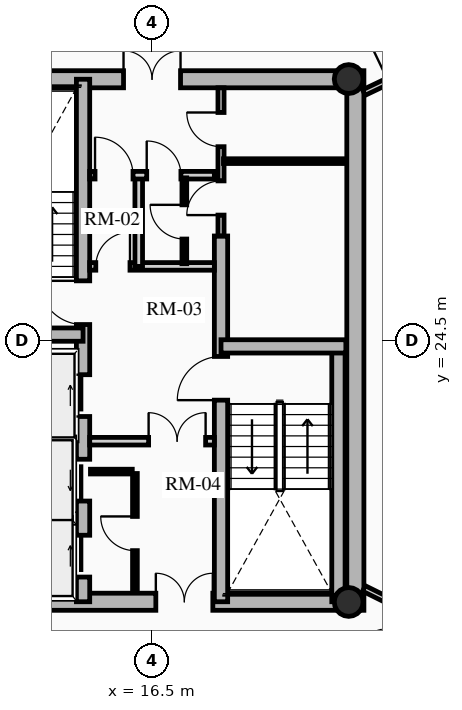
"""IFC4 building model, lengths in metres.
Left out: names, types, materials, properties, quantities, classifications, styles, units other than length and angle.
Written with IfcOpenShell. Run it as: python <this file> out.ifc"""

import sys

from ifc_helpers import new_model, si_unit, direction, frame, frame_2d, origin, origin_2d, place, context, subcontext, project, spatial, rectangle, hollow_circle, extrude, source, transform, mapped, element, fill, save


model = new_model("IFC4")
c1 = context("Model", 3, precision=1e-05, world=origin(), true_north=direction((0.0, 1.0)))
c2 = subcontext(c1, "Body", "Model", "MODEL_VIEW")
j1 = project(units=[si_unit("LENGTHUNIT", "METRE"), si_unit("PLANEANGLEUNIT", "RADIAN")], contexts=[c1])
p1 = place(None, origin())
s1 = spatial("IfcSite", under=j1, at=p1, CompositionType="ELEMENT")
p2 = place(p1, origin())
s2 = spatial("IfcBuilding", under=s1, at=p2, CompositionType="ELEMENT")
p3 = place(p2, frame((0.0, 0.0, 144.04)))
s3 = spatial("IfcBuildingStorey", under=s2, at=p3, CompositionType="ELEMENT", Elevation=144.04)
p4 = place(p3, frame((21.85, 17.4, 0.0), z_axis=(0.0, 0.0, 1.0), x_axis=(0.0, 1.0, 0.0)))
e1 = element("IfcWall", 1, at=p4, inside=s3, PredefinedType="SHEAR", context=c2, shape_type="SweptSolid", body=[
    extrude(rectangle(XDim=14.2, YDim=0.45, at=frame_2d((7.1, 0.0))), origin(), (0.0, 0.0, 1.0), 3.06),
])
p5 = place(p3, frame((11.15, 17.625, 0.0), z_axis=(0.0, 0.0, 1.0), x_axis=(1.0, 0.0, 0.0)))
e2 = element("IfcWall", 2, at=p5, inside=s3, PredefinedType="SHEAR", context=c2, shape_type="SweptSolid", body=[
    extrude(rectangle(XDim=10.7, YDim=0.45, at=frame_2d((5.35, 0.0))), origin(), (0.0, 0.0, 1.0), 3.06),
])
m1 = source(origin(), c2, "Body", "SweptSolid", [
    extrude(rectangle(XDim=1.5, YDim=2.02, at=frame_2d((0.75, 1.01))), frame((0.0, 0.235, 0.0), z_axis=(0.0, -1.0, 0.0), x_axis=(1.0, 0.0, 0.0)), (0.0, 0.0, 1.0), 0.47),
])
p6 = place(p5, frame((5.45, 0.0, 0.0)))
e3 = element("IfcOpeningElement", 3, at=p6, cuts=e2, PredefinedType="OPENING", context=c2, shape_type="MappedRepresentation", body=[
    mapped(m1, transform((0.0, 0.0, 0.0), x_axis=(1.0, 0.0, 0.0), y_axis=(0.0, 1.0, 0.0), z_axis=(0.0, 0.0, 1.0), scale=1.0)),
])
p7 = place(p3, frame((11.15, 31.375, 0.0), z_axis=(0.0, 0.0, 1.0), x_axis=(1.0, 0.0, 0.0)))
e4 = element("IfcWall", 4, at=p7, inside=s3, PredefinedType="SHEAR", context=c2, shape_type="SweptSolid", body=[
    extrude(rectangle(XDim=10.7, YDim=0.45, at=frame_2d((5.35, 0.0))), origin(), (0.0, 0.0, 1.0), 3.06),
])
p8 = place(p7, frame((4.6, 0.0, 0.0)))
e5 = element("IfcOpeningElement", 5, at=p8, cuts=e4, PredefinedType="OPENING", context=c2, shape_type="MappedRepresentation", body=[
    mapped(m1, transform((0.0, 0.0, 0.0), x_axis=(1.0, 0.0, 0.0), y_axis=(0.0, 1.0, 0.0), z_axis=(0.0, 0.0, 1.0), scale=1.0)),
])
p9 = place(p3, frame((14.685, 17.625, 0.0), z_axis=(0.0, 0.0, 1.0), x_axis=(0.0, 1.0, 0.0)))
e6 = element("IfcWall", 6, at=p9, inside=s3, PredefinedType="SHEAR", context=c2, shape_type="SweptSolid", body=[
    extrude(rectangle(XDim=13.75, YDim=0.35, at=frame_2d((6.875, 0.0))), origin(), (0.0, 0.0, 1.0), 3.06),
])
m2 = source(origin(), c2, "Body", "SweptSolid", [
    extrude(rectangle(XDim=1.1, YDim=2.015, at=frame_2d((0.55, 1.007))), frame((0.0, 0.185, 0.0), z_axis=(0.0, -1.0, 0.0), x_axis=(1.0, 0.0, 0.0)), (0.0, 0.0, 1.0), 0.37),
])
p10 = place(p9, frame((4.875, 0.0, 0.0)))
e7 = element("IfcOpeningElement", 7, at=p10, cuts=e6, PredefinedType="OPENING", context=c2, shape_type="MappedRepresentation", body=[
    mapped(m2, transform((0.0, 0.0, 0.0), x_axis=(1.0, 0.0, 0.0), y_axis=(0.0, 1.0, 0.0), z_axis=(0.0, 0.0, 1.0), scale=1.0)),
])
p11 = place(p9, frame((0.65, 0.0, 0.0)))
e8 = element("IfcOpeningElement", 8, at=p11, cuts=e6, PredefinedType="OPENING", context=c2, shape_type="MappedRepresentation", body=[
    mapped(m2, transform((0.0, 0.0, 0.0), x_axis=(1.0, 0.0, 0.0), y_axis=(0.0, 1.0, 0.0), z_axis=(0.0, 0.0, 1.0), scale=1.0)),
])
p12 = place(p9, frame((2.65, 0.0, 0.0)))
e9 = element("IfcOpeningElement", 9, at=p12, cuts=e6, PredefinedType="OPENING", context=c2, shape_type="MappedRepresentation", body=[
    mapped(m2, transform((0.0, 0.0, 0.0), x_axis=(1.0, 0.0, 0.0), y_axis=(0.0, 1.0, 0.0), z_axis=(0.0, 0.0, 1.0), scale=1.0)),
])
m3 = source(origin(), c2, "Body", "SweptSolid", [
    extrude(rectangle(XDim=1.15, YDim=2.02, at=frame_2d((0.575, 1.01))), frame((0.0, 0.185, 0.0), z_axis=(0.0, -1.0, 0.0), x_axis=(1.0, 0.0, 0.0)), (0.0, 0.0, 1.0), 0.37),
])
p13 = place(p9, frame((7.295, 0.0, 0.0)))
e10 = element("IfcOpeningElement", 10, at=p13, cuts=e6, PredefinedType="OPENING", context=c2, shape_type="MappedRepresentation", body=[
    mapped(m3, transform((0.0, 0.0, 0.0), x_axis=(1.0, 0.0, 0.0), y_axis=(0.0, 1.0, 0.0), z_axis=(0.0, 0.0, 1.0), scale=1.0)),
])
p14 = place(p3, frame((18.315, 17.625, 0.0), z_axis=(0.0, 0.0, 1.0), x_axis=(0.0, 1.0, 0.0)))
e11 = element("IfcWall", 11, at=p14, inside=s3, PredefinedType="SHEAR", context=c2, shape_type="SweptSolid", body=[
    extrude(rectangle(XDim=9.625, YDim=0.35, at=frame_2d((4.812, 0.0))), origin(), (0.0, 0.0, 1.0), 3.06),
])
p15 = place(p14, frame((5.305, 0.0, 0.0)))
e12 = element("IfcOpeningElement", 12, at=p15, cuts=e11, PredefinedType="OPENING", context=c2, shape_type="MappedRepresentation", body=[
    mapped(m3, transform((0.0, 0.0, 0.0), x_axis=(1.0, 0.0, 0.0), y_axis=(0.0, 1.0, 0.0), z_axis=(0.0, 0.0, 1.0), scale=1.0)),
])
p16 = place(p3, frame((11.4, 24.655, 0.0), z_axis=(0.0, 0.0, 1.0), x_axis=(1.0, 0.0, 0.0)))
e13 = element("IfcWall", 13, at=p16, inside=s3, PredefinedType="SHEAR", context=c2, shape_type="SweptSolid", body=[
    extrude(rectangle(XDim=3.285, YDim=0.35, at=frame_2d((1.643, 0.0))), origin(), (0.0, 0.0, 1.0), 3.06),
])
p17 = place(p3, frame((21.405, 17.625, 0.0), z_axis=(0.0, 0.0, 1.0), x_axis=(0.0, 1.0, 0.0)))
e14 = element("IfcWall", 14, at=p17, inside=s3, PredefinedType="SHEAR", context=c2, shape_type="SweptSolid", body=[
    extrude(rectangle(XDim=6.72, YDim=0.35, at=frame_2d((3.36, 0.0))), origin(), (0.0, 0.0, 1.0), 3.06),
])
p18 = place(p3, frame((18.315, 24.345, 0.0), z_axis=(0.0, 0.0, 1.0), x_axis=(1.0, 0.0, 0.0)))
e15 = element("IfcWall", 15, at=p18, inside=s3, PredefinedType="SHEAR", context=c2, shape_type="SweptSolid", body=[
    extrude(rectangle(XDim=3.285, YDim=0.35, at=frame_2d((1.643, 0.0))), origin(), (0.0, 0.0, 1.0), 3.06),
])
for number, where, z_axis, x_axis in (
    (16, (21.675, 17.62, 0.0), (0.0, 0.0, 1.0), (1.0, 0.0, 0.0)),
    (17, (21.675, 31.38, 0.0), (0.0, 0.0, 1.0), (1.0, 0.0, 0.0)),
):
    element("IfcColumn", number, at=place(p3, frame(where, z_axis=z_axis, x_axis=x_axis)), inside=s3, PredefinedType="COLUMN", context=c2, shape_type="SweptSolid", body=[
        extrude(hollow_circle(Radius=0.38, WallThickness=0.032, at=origin_2d()), origin(), (0.0, 0.0, 1.0), 3.06),
    ])
for number, where, z_axis, x_axis in (
    (18, (11.52, 21.8, 0.0), (0.0, 0.0, 1.0), (1.0, 0.0, 0.0)),
    (19, (11.52, 19.825, 0.0), (0.0, 0.0, 1.0), (1.0, 0.0, 0.0)),
):
    element("IfcWall", number, at=place(p3, frame(where, z_axis=z_axis, x_axis=x_axis)), inside=s3, PredefinedType="SHEAR", context=c2, shape_type="SweptSolid", body=[
        extrude(rectangle(XDim=2.97, YDim=0.2, at=frame_2d((1.485, 0.0))), origin(), (0.0, 0.0, 1.0), 3.06),
    ])
p19 = place(p3, frame((14.86, 21.85, 0.0), z_axis=(0.0, 0.0, 1.0), x_axis=(1.0, 0.0, 0.0)))
e20 = element("IfcWall", 20, at=p19, inside=s3, PredefinedType="PARTITIONING", context=c2, shape_type="SweptSolid", body=[
    extrude(rectangle(XDim=3.28, YDim=0.2, at=frame_2d((1.64, 0.0))), origin(), (0.0, 0.0, 1.0), 2.705),
])
m4 = source(origin(), c2, "Body", "SweptSolid", [
    extrude(rectangle(XDim=1.5, YDim=2.02, at=frame_2d((0.75, 1.01))), frame((0.0, 0.11, 0.0), z_axis=(0.0, -1.0, 0.0), x_axis=(1.0, 0.0, 0.0)), (0.0, 0.0, 1.0), 0.22),
])
p20 = place(p19, frame((1.55, 0.0, 0.0)))
e21 = element("IfcOpeningElement", 21, at=p20, cuts=e20, PredefinedType="OPENING", context=c2, shape_type="MappedRepresentation", body=[
    mapped(m4, transform((0.0, 0.0, 0.0), x_axis=(1.0, 0.0, 0.0), y_axis=(0.0, 1.0, 0.0), z_axis=(0.0, 0.0, 1.0), scale=1.0)),
])
p21 = place(p3, frame((14.86, 26.45, 0.0), z_axis=(0.0, 0.0, 1.0), x_axis=(1.0, 0.0, 0.0)))
e22 = element("IfcWall", 22, at=p21, inside=s3, PredefinedType="PARTITIONING", context=c2, shape_type="SweptSolid", body=[
    extrude(rectangle(XDim=3.28, YDim=0.2, at=frame_2d((1.64, 0.0))), origin(), (0.0, 0.0, 1.0), 2.705),
])
m5 = source(origin(), c2, "Body", "SweptSolid", [
    extrude(rectangle(XDim=0.9, YDim=2.005, at=frame_2d((0.45, 1.002))), frame((0.0, 0.11, 0.0), z_axis=(0.0, -1.0, 0.0), x_axis=(1.0, 0.0, 0.0)), (0.0, 0.0, 1.0), 0.22),
])
p22 = place(p21, frame((0.16, 0.0, 0.0)))
e23 = element("IfcOpeningElement", 23, at=p22, cuts=e22, PredefinedType="OPENING", context=c2, shape_type="MappedRepresentation", body=[
    mapped(m5, transform((0.0, 0.0, 0.0), x_axis=(1.0, 0.0, 0.0), y_axis=(0.0, 1.0, 0.0), z_axis=(0.0, 0.0, 1.0), scale=1.0)),
])
p23 = place(p3, frame((16.15, 26.45, 0.0), z_axis=(0.0, 0.0, 1.0), x_axis=(0.0, 1.0, 0.0)))
e24 = element("IfcWall", 24, at=p23, inside=s3, PredefinedType="PARTITIONING", context=c2, shape_type="SweptSolid", body=[
    extrude(rectangle(XDim=2.4, YDim=0.2, at=frame_2d((1.2, 0.0))), origin(), (0.0, 0.0, 1.0), 2.705),
])
p24 = place(p3, frame((14.86, 28.85, 0.0), z_axis=(0.0, 0.0, 1.0), x_axis=(1.0, 0.0, 0.0)))
e25 = element("IfcWall", 25, at=p24, inside=s3, PredefinedType="PARTITIONING", context=c2, shape_type="SweptSolid", body=[
    extrude(rectangle(XDim=3.28, YDim=0.2, at=frame_2d((1.64, 0.0))), origin(), (0.0, 0.0, 1.0), 2.705),
])
m6 = source(origin(), c2, "Body", "SweptSolid", [
    extrude(rectangle(XDim=1.0, YDim=2.015, at=frame_2d((0.5, 1.007))), frame((0.0, 0.11, 0.0), z_axis=(0.0, -1.0, 0.0), x_axis=(1.0, 0.0, 0.0)), (0.0, 0.0, 1.0), 0.22),
])
p25 = place(p24, frame((0.14, 0.0, 0.0)))
e26 = element("IfcOpeningElement", 26, at=p25, cuts=e25, PredefinedType="OPENING", context=c2, shape_type="MappedRepresentation", body=[
    mapped(m6, transform((0.0, 0.0, 0.0), x_axis=(1.0, 0.0, 0.0), y_axis=(0.0, 1.0, 0.0), z_axis=(0.0, 0.0, 1.0), scale=1.0)),
])
p26 = place(p24, frame((1.5, 0.0, 0.0)))
e27 = element("IfcOpeningElement", 27, at=p26, cuts=e25, PredefinedType="OPENING", context=c2, shape_type="MappedRepresentation", body=[
    mapped(m5, transform((0.0, 0.0, 0.0), x_axis=(1.0, 0.0, 0.0), y_axis=(0.0, 1.0, 0.0), z_axis=(0.0, 0.0, 1.0), scale=1.0)),
])
p27 = place(p3, frame((16.05, 17.92, 0.0), z_axis=(0.0, 0.0, 1.0), x_axis=(0.0, 1.0, 0.0)))
e28 = element("IfcWall", 28, at=p27, inside=s3, PredefinedType="PARTITIONING", context=c2, shape_type="SweptSolid", body=[
    extrude(rectangle(XDim=3.08, YDim=0.125, at=frame_2d((1.54, 0.0))), origin(), (0.0, 0.0, 1.0), 2.705),
])
m7 = source(origin(), c2, "Body", "SweptSolid", [
    extrude(rectangle(XDim=0.9, YDim=2.005, at=frame_2d((0.45, 1.002))), frame((0.0, 0.073, 0.0), z_axis=(0.0, -1.0, 0.0), x_axis=(1.0, 0.0, 0.0)), (0.0, 0.0, 1.0), 0.145),
])
p28 = place(p27, frame((1.05, 0.0, 0.0)))
e29 = element("IfcOpeningElement", 29, at=p28, cuts=e28, PredefinedType="OPENING", context=c2, shape_type="MappedRepresentation", body=[
    mapped(m7, transform((0.0, 0.0, 0.0), x_axis=(1.0, 0.0, 0.0), y_axis=(0.0, 1.0, 0.0), z_axis=(0.0, 0.0, 1.0), scale=1.0)),
])
p29 = place(p3, frame((14.88, 21.05, 0.0), z_axis=(0.0, 0.0, 1.0), x_axis=(1.0, 0.0, 0.0)))
e30 = element("IfcWall", 30, at=p29, inside=s3, PredefinedType="PARTITIONING", context=c2, shape_type="SweptSolid", body=[
    extrude(rectangle(XDim=1.1, YDim=0.125, at=frame_2d((0.55, 0.0))), origin(), (0.0, 0.0, 1.0), 2.705),
])
p30 = place(p3, frame((17.35, 26.52, 0.0), z_axis=(0.0, 0.0, 1.0), x_axis=(0.0, 1.0, 0.0)))
e31 = element("IfcWall", 31, at=p30, inside=s3, PredefinedType="PARTITIONING", context=c2, shape_type="SweptSolid", body=[
    extrude(rectangle(XDim=2.26, YDim=0.125, at=frame_2d((1.13, 0.0))), origin(), (0.0, 0.0, 1.0), 2.705),
])
p31 = place(p30, frame((0.65, 0.0, 0.0)))
e32 = element("IfcOpeningElement", 32, at=p31, cuts=e31, PredefinedType="OPENING", context=c2, shape_type="MappedRepresentation", body=[
    mapped(m7, transform((0.0, 0.0, 0.0), x_axis=(1.0, 0.0, 0.0), y_axis=(0.0, 1.0, 0.0), z_axis=(0.0, 0.0, 1.0), scale=1.0)),
])
p32 = place(p3, frame((18.315, 27.25, 0.0), z_axis=(0.0, 0.0, 1.0), x_axis=(0.0, 1.0, 0.0)))
e33 = element("IfcWall", 33, at=p32, inside=s3, PredefinedType="PARTITIONING", context=c2, shape_type="SweptSolid", body=[
    extrude(rectangle(XDim=3.9, YDim=0.16, at=frame_2d((1.95, 0.0))), origin(), (0.0, 0.0, 1.0), 2.705),
])
m8 = source(origin(), c2, "Body", "SweptSolid", [
    extrude(rectangle(XDim=0.9, YDim=2.005, at=frame_2d((0.45, 1.002))), frame((0.0, 0.09, 0.0), z_axis=(0.0, -1.0, 0.0), x_axis=(1.0, 0.0, 0.0)), (0.0, 0.0, 1.0), 0.18),
])
p33 = place(p32, frame((0.55, 0.0, 0.0)))
e34 = element("IfcOpeningElement", 34, at=p33, cuts=e33, PredefinedType="OPENING", context=c2, shape_type="MappedRepresentation", body=[
    mapped(m8, transform((0.0, 0.0, 0.0), x_axis=(1.0, 0.0, 0.0), y_axis=(0.0, 1.0, 0.0), z_axis=(0.0, 0.0, 1.0), scale=1.0)),
])
p34 = place(p32, frame((2.35, 0.0, 0.0)))
e35 = element("IfcOpeningElement", 35, at=p34, cuts=e33, PredefinedType="OPENING", context=c2, shape_type="MappedRepresentation", body=[
    mapped(m8, transform((0.0, 0.0, 0.0), x_axis=(1.0, 0.0, 0.0), y_axis=(0.0, 1.0, 0.0), z_axis=(0.0, 0.0, 1.0), scale=1.0)),
])
p35 = place(p3, frame((18.38, 29.22, 0.0), z_axis=(0.0, 0.0, 1.0), x_axis=(1.0, 0.0, 0.0)))
e36 = element("IfcWall", 36, at=p35, inside=s3, PredefinedType="PARTITIONING", context=c2, shape_type="SweptSolid", body=[
    extrude(rectangle(XDim=3.22, YDim=0.125, at=frame_2d((1.61, 0.0))), origin(), (0.0, 0.0, 1.0), 2.242),
])
p36 = place(p3, frame((22.075, 31.025, 0.0), z_axis=(0.0, 0.0, 1.0), x_axis=(0.902802823792, 0.430054719022, 0.0)))
e37 = element("IfcWall", 37, at=p36, inside=s3, PredefinedType="PARTITIONING", context=c2, shape_type="SweptSolid", body=[
    extrude(rectangle(XDim=1.956, YDim=0.16, at=frame_2d((0.978, 0.0))), origin(), (0.0, 0.0, 1.0), 2.275),
])
m9 = source(origin(), c2, "Body", "SweptSolid", [
    extrude(rectangle(XDim=1.05, YDim=2.015, at=frame_2d((0.525, 1.007))), frame((0.0, 0.09, 0.0), z_axis=(0.0, -1.0, 0.0), x_axis=(1.0, 0.0, 0.0)), (0.0, 0.0, 1.0), 0.18),
])
p37 = place(p36, frame((0.706, 0.0, 0.0)))
e38 = element("IfcOpeningElement", 38, at=p37, cuts=e37, PredefinedType="OPENING", context=c2, shape_type="MappedRepresentation", body=[
    mapped(m9, transform((0.0, 0.0, 0.0), x_axis=(1.0, 0.0, 0.0), y_axis=(0.0, 1.0, 0.0), z_axis=(0.0, 0.0, 1.0), scale=1.0)),
])
p38 = place(p3, frame((22.075, 17.975, 0.0), z_axis=(0.0, 0.0, 1.0), x_axis=(0.89622947115, -0.443590729212, 0.0)))
e39 = element("IfcWall", 39, at=p38, inside=s3, PredefinedType="PARTITIONING", context=c2, shape_type="SweptSolid", body=[
    extrude(rectangle(XDim=2.051, YDim=0.16, at=frame_2d((1.025, 0.0))), origin(), (0.0, 0.0, 1.0), 2.275),
])
p39 = place(p38, frame((0.801, 0.0, 0.0)))
e40 = element("IfcOpeningElement", 40, at=p39, cuts=e39, PredefinedType="OPENING", context=c2, shape_type="MappedRepresentation", body=[
    mapped(m9, transform((0.0, 0.0, 0.0), x_axis=(1.0, 0.0, 0.0), y_axis=(0.0, 1.0, 0.0), z_axis=(0.0, 0.0, 1.0), scale=1.0)),
])
m10 = source(origin(), c2, "Body", "SweptSolid", [
    extrude(rectangle(XDim=1.1, YDim=2.015, at=frame_2d((0.55, 1.007))), frame((0.0, 0.025, 0.0), z_axis=(0.0, -1.0, 0.0), x_axis=(1.0, 0.0, 0.0)), (0.0, 0.0, 1.0), 0.05),
])
p40 = place(p10, origin())
e41 = element("IfcDoor", 41, at=p40, inside=s3, OperationType="SLIDING_TO_RIGHT", PredefinedType="DOOR", context=c2, shape_type="MappedRepresentation", body=[
    mapped(m10, transform((0.0, 0.0, 0.0), x_axis=(1.0, 0.0, 0.0), y_axis=(0.0, 1.0, 0.0), z_axis=(0.0, 0.0, 1.0), scale=1.0)),
])
fill(e7, e41)
p41 = place(p11, origin())
e42 = element("IfcDoor", 42, at=p41, inside=s3, OperationType="SLIDING_TO_RIGHT", PredefinedType="DOOR", context=c2, shape_type="MappedRepresentation", body=[
    mapped(m10, transform((0.0, 0.0, 0.0), x_axis=(1.0, 0.0, 0.0), y_axis=(0.0, 1.0, 0.0), z_axis=(0.0, 0.0, 1.0), scale=1.0)),
])
fill(e8, e42)
p42 = place(p12, origin())
e43 = element("IfcDoor", 43, at=p42, inside=s3, OperationType="SLIDING_TO_LEFT", PredefinedType="DOOR", context=c2, shape_type="MappedRepresentation", body=[
    mapped(m10, transform((0.0, 0.0, 0.0), x_axis=(1.0, 0.0, 0.0), y_axis=(0.0, 1.0, 0.0), z_axis=(0.0, 0.0, 1.0), scale=1.0)),
])
fill(e9, e43)
m11 = source(origin(), c2, "Body", "SweptSolid", [
    extrude(rectangle(XDim=1.15, YDim=2.02, at=frame_2d((0.575, 1.01))), frame((0.0, 0.025, 0.0), z_axis=(0.0, -1.0, 0.0), x_axis=(1.0, 0.0, 0.0)), (0.0, 0.0, 1.0), 0.05),
])
p43 = place(p13, origin())
e44 = element("IfcDoor", 44, at=p43, inside=s3, OperationType="SINGLE_SWING_RIGHT", PredefinedType="DOOR", context=c2, shape_type="MappedRepresentation", body=[
    mapped(m11, transform((0.0, 0.0, 0.0), x_axis=(1.0, 0.0, 0.0), y_axis=(0.0, 1.0, 0.0), z_axis=(0.0, 0.0, 1.0), scale=1.0)),
])
fill(e10, e44)
p44 = place(p15, origin())
e45 = element("IfcDoor", 45, at=p44, inside=s3, OperationType="SINGLE_SWING_LEFT", PredefinedType="DOOR", context=c2, shape_type="MappedRepresentation", body=[
    mapped(m11, transform((0.0, 0.0, 0.0), x_axis=(1.0, 0.0, 0.0), y_axis=(0.0, 1.0, 0.0), z_axis=(0.0, 0.0, 1.0), scale=1.0)),
])
fill(e12, e45)
m12 = source(origin(), c2, "Body", "SweptSolid", [
    extrude(rectangle(XDim=1.5, YDim=2.02, at=frame_2d((0.75, 1.01))), frame((0.0, 0.025, 0.0), z_axis=(0.0, -1.0, 0.0), x_axis=(1.0, 0.0, 0.0)), (0.0, 0.0, 1.0), 0.05),
])
p45 = place(p8, origin())
e46 = element("IfcDoor", 46, at=p45, inside=s3, OperationType="DOUBLE_DOOR_SINGLE_SWING", PredefinedType="DOOR", context=c2, shape_type="MappedRepresentation", body=[
    mapped(m12, transform((0.0, 0.0, 0.0), x_axis=(1.0, 0.0, 0.0), y_axis=(0.0, 1.0, 0.0), z_axis=(0.0, 0.0, 1.0), scale=1.0)),
])
fill(e5, e46)
p46 = place(p6, origin())
e47 = element("IfcDoor", 47, at=p46, inside=s3, OperationType="DOUBLE_DOOR_SINGLE_SWING", PredefinedType="DOOR", context=c2, shape_type="MappedRepresentation", body=[
    mapped(m12, transform((0.0, 0.0, 0.0), x_axis=(1.0, 0.0, 0.0), y_axis=(0.0, 1.0, 0.0), z_axis=(0.0, 0.0, 1.0), scale=1.0)),
])
fill(e3, e47)
p47 = place(p20, origin())
e48 = element("IfcDoor", 48, at=p47, inside=s3, OperationType="DOUBLE_DOOR_SINGLE_SWING", PredefinedType="DOOR", context=c2, shape_type="MappedRepresentation", body=[
    mapped(m12, transform((0.0, 0.0, 0.0), x_axis=(1.0, 0.0, 0.0), y_axis=(0.0, 1.0, 0.0), z_axis=(0.0, 0.0, 1.0), scale=1.0)),
])
fill(e21, e48)
m13 = source(origin(), c2, "Body", "SweptSolid", [
    extrude(rectangle(XDim=0.9, YDim=2.005, at=frame_2d((0.45, 1.002))), frame((0.0, 0.025, 0.0), z_axis=(0.0, -1.0, 0.0), x_axis=(1.0, 0.0, 0.0)), (0.0, 0.0, 1.0), 0.05),
])
p48 = place(p22, origin())
e49 = element("IfcDoor", 49, at=p48, inside=s3, OperationType="SINGLE_SWING_RIGHT", PredefinedType="DOOR", context=c2, shape_type="MappedRepresentation", body=[
    mapped(m13, transform((0.0, 0.0, 0.0), x_axis=(1.0, 0.0, 0.0), y_axis=(0.0, 1.0, 0.0), z_axis=(0.0, 0.0, 1.0), scale=1.0)),
])
fill(e23, e49)
m14 = source(origin(), c2, "Body", "SweptSolid", [
    extrude(rectangle(XDim=1.0, YDim=2.015, at=frame_2d((0.5, 1.007))), frame((0.0, 0.025, 0.0), z_axis=(0.0, -1.0, 0.0), x_axis=(1.0, 0.0, 0.0)), (0.0, 0.0, 1.0), 0.05),
])
p49 = place(p25, origin())
e50 = element("IfcDoor", 50, at=p49, inside=s3, OperationType="SINGLE_SWING_LEFT", PredefinedType="DOOR", context=c2, shape_type="MappedRepresentation", body=[
    mapped(m14, transform((0.0, 0.0, 0.0), x_axis=(1.0, 0.0, 0.0), y_axis=(0.0, 1.0, 0.0), z_axis=(0.0, 0.0, 1.0), scale=1.0)),
])
fill(e26, e50)
p50 = place(p28, origin())
e51 = element("IfcDoor", 51, at=p50, inside=s3, OperationType="SINGLE_SWING_RIGHT", PredefinedType="DOOR", context=c2, shape_type="MappedRepresentation", body=[
    mapped(m13, transform((0.0, 0.0, 0.0), x_axis=(1.0, 0.0, 0.0), y_axis=(0.0, 1.0, 0.0), z_axis=(0.0, 0.0, 1.0), scale=1.0)),
])
fill(e29, e51)
p51 = place(p26, origin())
e52 = element("IfcDoor", 52, at=p51, inside=s3, OperationType="SINGLE_SWING_LEFT", PredefinedType="DOOR", context=c2, shape_type="MappedRepresentation", body=[
    mapped(m13, transform((0.0, 0.0, 0.0), x_axis=(1.0, 0.0, 0.0), y_axis=(0.0, 1.0, 0.0), z_axis=(0.0, 0.0, 1.0), scale=1.0)),
])
fill(e27, e52)
p52 = place(p31, origin())
e53 = element("IfcDoor", 53, at=p52, inside=s3, OperationType="SINGLE_SWING_RIGHT", PredefinedType="DOOR", context=c2, shape_type="MappedRepresentation", body=[
    mapped(m13, transform((0.0, 0.0, 0.0), x_axis=(1.0, 0.0, 0.0), y_axis=(0.0, 1.0, 0.0), z_axis=(0.0, 0.0, 1.0), scale=1.0)),
])
fill(e32, e53)
p53 = place(p33, origin())
e54 = element("IfcDoor", 54, at=p53, inside=s3, OperationType="SINGLE_SWING_LEFT", PredefinedType="DOOR", context=c2, shape_type="MappedRepresentation", body=[
    mapped(m13, transform((0.0, 0.0, 0.0), x_axis=(1.0, 0.0, 0.0), y_axis=(0.0, 1.0, 0.0), z_axis=(0.0, 0.0, 1.0), scale=1.0)),
])
fill(e34, e54)
p54 = place(p34, origin())
e55 = element("IfcDoor", 55, at=p54, inside=s3, OperationType="SINGLE_SWING_RIGHT", PredefinedType="DOOR", context=c2, shape_type="MappedRepresentation", body=[
    mapped(m13, transform((0.0, 0.0, 0.0), x_axis=(1.0, 0.0, 0.0), y_axis=(0.0, 1.0, 0.0), z_axis=(0.0, 0.0, 1.0), scale=1.0)),
])
fill(e35, e55)
save(model, sys.argv[1])
